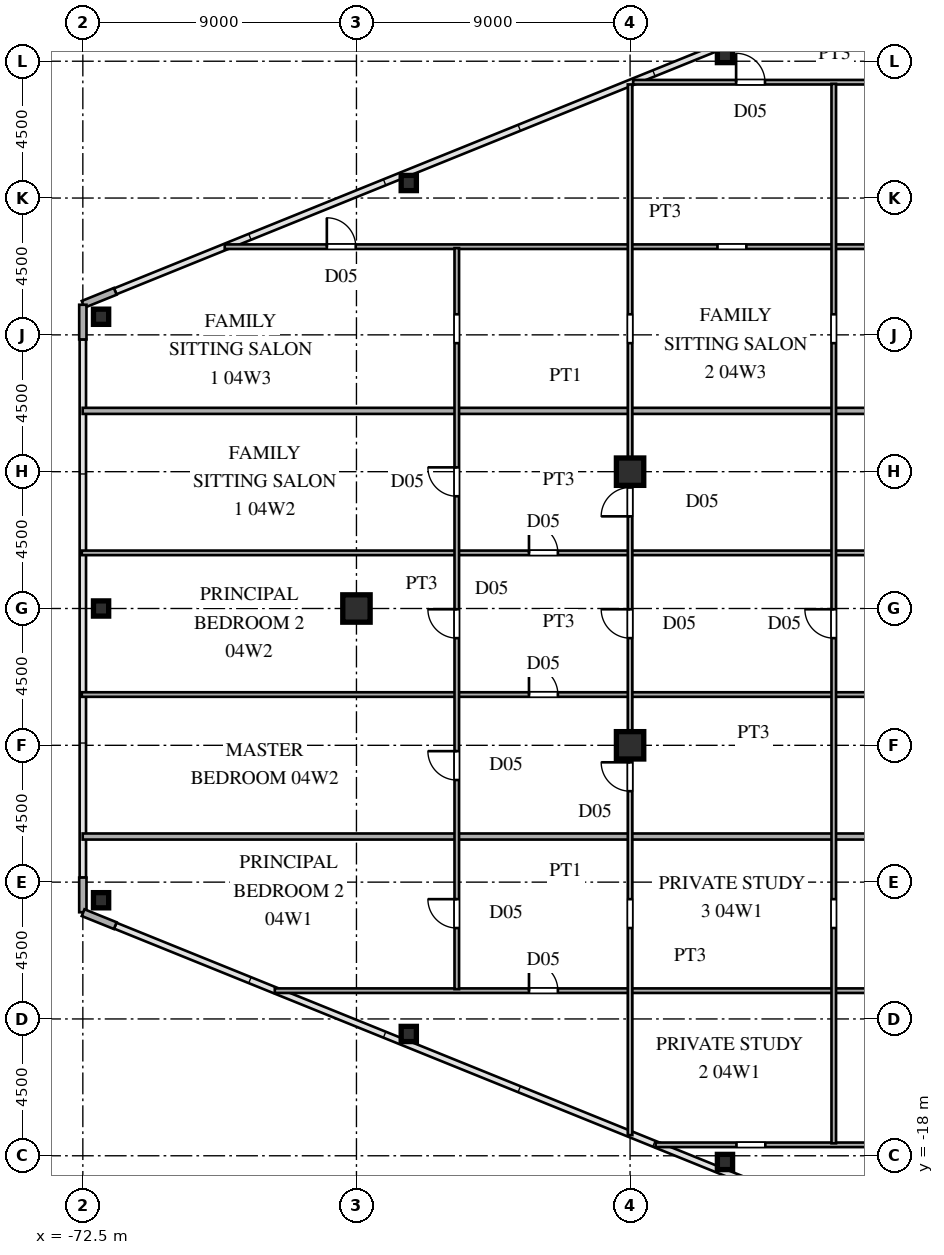
"""IFC4 building model, lengths in metres.
Left out: names, types, materials, properties, quantities, classifications, styles, units other than length and angle.
Written with IfcOpenShell. Run it as: python <this file> out.ifc"""

import sys

from ifc_helpers import new_model, si_unit, direction, frame, frame_2d, origin, origin_2d, place, context, subcontext, project, spatial, rectangle, hollow_rectangle, i_section, extrude, source, transform, mapped, element, fill, save


model = new_model("IFC4")
c1 = context("Model", 3, precision=1e-05, world=origin(), true_north=direction((0.0, 1.0)))
c2 = subcontext(c1, "Body", "Model", "MODEL_VIEW")
j1 = project(units=[si_unit("LENGTHUNIT", "METRE"), si_unit("PLANEANGLEUNIT", "RADIAN")], contexts=[c1])
p1 = place(None, origin())
s1 = spatial("IfcSite", under=j1, at=p1, CompositionType="ELEMENT")
p2 = place(p1, origin())
s2 = spatial("IfcBuilding", under=s1, at=p2, CompositionType="ELEMENT")
p3 = place(p2, frame((0.0, 0.0, 18.9)))
s3 = spatial("IfcBuildingStorey", under=s2, at=p3, CompositionType="ELEMENT", Elevation=18.9)
m1 = source(origin(), c2, "Body", "SweptSolid", [
    extrude(i_section(OverallWidth=0.9, OverallDepth=0.9, WebThickness=0.036, FlangeThickness=0.055, at=origin_2d()), origin(), (0.0, 0.0, 1.0), 3.6),
])
for number, where, z_axis, x_axis in (
    (1, (-54.5, -4.5, 0.0), (0.0, 0.0, 1.0), (1.0, 0.0, 0.0)),
    (2, (-54.5, 4.5, 0.0), (0.0, 0.0, 1.0), (1.0, 0.0, 0.0)),
    (3, (-63.5, 0.0, 0.0), (0.0, 0.0, 1.0), (1.0, 0.0, 0.0)),
):
    element("IfcColumn", number, at=place(p3, frame(where, z_axis=z_axis, x_axis=x_axis)), inside=s3, PredefinedType="COLUMN", context=c2, shape_type="MappedRepresentation", body=[
        mapped(m1, transform((0.0, 0.0, 0.0), scale=1.0)),
    ])
m2 = source(origin(), c2, "Body", "SweptSolid", [
    extrude(hollow_rectangle(XDim=0.5, YDim=0.5, WallThickness=0.02, at=origin_2d()), origin(), (0.0, 0.0, 1.0), 3.6),
])
for number, where, z_axis, x_axis in (
    (4, (-71.9, 9.596, 0.0), (0.0, 0.0, 1.0), (1.0, 0.0, 0.0)),
    (5, (-71.9, -9.596, 0.0), (0.0, 0.0, 1.0), (1.0, 0.0, 0.0)),
    (6, (-51.378, -18.204, 0.0), (0.0, 0.0, 1.0), (1.0, 0.0, 0.0)),
    (7, (-61.779, -13.994, 0.0), (0.0, 0.0, 1.0), (1.0, 0.0, 0.0)),
    (8, (-51.378, 18.204, 0.0), (0.0, 0.0, 1.0), (1.0, 0.0, 0.0)),
    (9, (-61.779, 13.994, 0.0), (0.0, 0.0, 1.0), (1.0, 0.0, 0.0)),
    (10, (-71.9, 0.0, 0.0), (0.0, 0.0, 1.0), (1.0, 0.0, 0.0)),
):
    element("IfcColumn", number, at=place(p3, frame(where, z_axis=z_axis, x_axis=x_axis)), inside=s3, PredefinedType="COLUMN", context=c2, shape_type="MappedRepresentation", body=[
        mapped(m2, transform((0.0, 0.0, 0.0), scale=1.0)),
    ])
for number, where, z_axis, x_axis in (
    (11, (-71.434, 10.431, 0.0), (0.0, 0.0, 1.0), (-0.927, -0.375, 0.0)),
    (12, (-72.5, 9.99, 0.0), (0.0, 0.0, 1.0), (0.0, -1.0, 0.0)),
    (13, (-72.5, -8.85, 0.0), (0.0, 0.0, 1.0), (0.0, -1.0, 0.0)),
    (14, (-72.491, -10.004, 0.0), (0.0, 0.0, 1.0), (0.927, -0.375, 0.0)),
):
    element("IfcWall", number, at=place(p3, frame(where, z_axis=z_axis, x_axis=x_axis)), inside=s3, PredefinedType="SOLIDWALL", context=c2, shape_type="SweptSolid", body=[
        extrude(rectangle(XDim=1.14, YDim=0.24, at=frame_2d((0.57, 0.0))), origin(), (0.0, 0.0, 1.0), 3.38),
    ])
p4 = place(p3, frame((-53.66, -17.64, 0.0), z_axis=(0.0, 0.0, 1.0), x_axis=(1.0, 0.0, 0.0)))
e15 = element("IfcWall", 15, at=p4, inside=s3, PredefinedType="PARTITIONING", context=c2, shape_type="SweptSolid", body=[
    extrude(rectangle(XDim=12.51, YDim=0.15, at=frame_2d((6.255, 0.0))), origin(), (0.0, 0.0, 1.0), 3.38),
])
p5 = place(p4, frame((8.735, 0.0, 0.0)))
e16 = element("IfcOpeningElement", 16, at=p5, cuts=e15, PredefinedType="OPENING", context=c2, shape_type="SweptSolid", body=[
    extrude(rectangle(XDim=0.95, YDim=2.15, at=frame_2d((0.475, 1.075))), frame((0.0, 0.085, 0.0), z_axis=(0.0, -1.0, 0.0), x_axis=(1.0, 0.0, 0.0)), (0.0, 0.0, 1.0), 0.17),
])
p6 = place(p4, frame((2.659, 0.0, 0.0)))
e17 = element("IfcOpeningElement", 17, at=p6, cuts=e15, PredefinedType="OPENING", context=c2, shape_type="SweptSolid", body=[
    extrude(rectangle(XDim=0.95, YDim=2.15, at=frame_2d((0.475, 1.075))), frame((0.0, 0.085, 0.0), z_axis=(0.0, -1.0, 0.0), x_axis=(1.0, 0.0, 0.0)), (0.0, 0.0, 1.0), 0.17),
])
p7 = place(p3, frame((-66.186, -12.57, 0.0), z_axis=(0.0, 0.0, 1.0), x_axis=(1.0, 0.0, 0.0)))
e18 = element("IfcWall", 18, at=p7, inside=s3, PredefinedType="PARTITIONING", context=c2, shape_type="SweptSolid", body=[
    extrude(rectangle(XDim=25.036, YDim=0.15, at=frame_2d((12.518, 0.0))), origin(), (0.0, 0.0, 1.0), 3.38),
])
p8 = place(p7, frame((21.261, 0.0, 0.0)))
e19 = element("IfcOpeningElement", 19, at=p8, cuts=e18, PredefinedType="OPENING", context=c2, shape_type="SweptSolid", body=[
    extrude(rectangle(XDim=0.95, YDim=2.15, at=frame_2d((0.475, 1.075))), frame((0.0, 0.085, 0.0), z_axis=(0.0, -1.0, 0.0), x_axis=(1.0, 0.0, 0.0)), (0.0, 0.0, 1.0), 0.17),
])
p9 = place(p7, frame((8.361, 0.0, 0.0)))
e20 = element("IfcOpeningElement", 20, at=p9, cuts=e18, PredefinedType="OPENING", context=c2, shape_type="SweptSolid", body=[
    extrude(rectangle(XDim=0.95, YDim=2.15, at=frame_2d((0.475, 1.075))), frame((0.0, 0.085, 0.0), z_axis=(0.0, -1.0, 0.0), x_axis=(1.0, 0.0, 0.0)), (0.0, 0.0, 1.0), 0.17),
])
p10 = place(p3, frame((-72.505, -7.5, 0.0), z_axis=(0.0, 0.0, 1.0), x_axis=(1.0, 0.0, 0.0)))
e21 = element("IfcWall", 21, at=p10, inside=s3, PredefinedType="PARTITIONING", context=c2, shape_type="SweptSolid", body=[
    extrude(rectangle(XDim=34.075, YDim=0.2, at=frame_2d((17.038, 0.0))), origin(), (0.0, 0.0, 1.0), 3.38),
])
p11 = place(p3, frame((-72.535, -2.83, 0.0), z_axis=(0.0, 0.0, 1.0), x_axis=(1.0, 0.0, 0.0)))
e22 = element("IfcWall", 22, at=p11, inside=s3, PredefinedType="PARTITIONING", context=c2, shape_type="SweptSolid", body=[
    extrude(rectangle(XDim=31.385, YDim=0.15, at=frame_2d((15.692, 0.0))), origin(), (0.0, 0.0, 1.0), 3.38),
])
p12 = place(p11, frame((27.61, 0.0, 0.0)))
e23 = element("IfcOpeningElement", 23, at=p12, cuts=e22, PredefinedType="OPENING", context=c2, shape_type="SweptSolid", body=[
    extrude(rectangle(XDim=0.95, YDim=2.15, at=frame_2d((0.475, 1.075))), frame((0.0, 0.085, 0.0), z_axis=(0.0, -1.0, 0.0), x_axis=(1.0, 0.0, 0.0)), (0.0, 0.0, 1.0), 0.17),
])
p13 = place(p11, frame((14.71, 0.0, 0.0)))
e24 = element("IfcOpeningElement", 24, at=p13, cuts=e22, PredefinedType="OPENING", context=c2, shape_type="SweptSolid", body=[
    extrude(rectangle(XDim=0.95, YDim=2.15, at=frame_2d((0.475, 1.075))), frame((0.0, 0.085, 0.0), z_axis=(0.0, -1.0, 0.0), x_axis=(1.0, 0.0, 0.0)), (0.0, 0.0, 1.0), 0.17),
])
p14 = place(p3, frame((-72.535, 1.83, 0.0), z_axis=(0.0, 0.0, 1.0), x_axis=(1.0, 0.0, 0.0)))
e25 = element("IfcWall", 25, at=p14, inside=s3, PredefinedType="PARTITIONING", context=c2, shape_type="SweptSolid", body=[
    extrude(rectangle(XDim=31.385, YDim=0.15, at=frame_2d((15.692, 0.0))), origin(), (0.0, 0.0, 1.0), 3.38),
])
p15 = place(p14, frame((27.61, 0.0, 0.0)))
e26 = element("IfcOpeningElement", 26, at=p15, cuts=e25, PredefinedType="OPENING", context=c2, shape_type="SweptSolid", body=[
    extrude(rectangle(XDim=0.95, YDim=2.15, at=frame_2d((0.475, 1.075))), frame((0.0, 0.085, 0.0), z_axis=(0.0, -1.0, 0.0), x_axis=(1.0, 0.0, 0.0)), (0.0, 0.0, 1.0), 0.17),
])
p16 = place(p14, frame((14.71, 0.0, 0.0)))
e27 = element("IfcOpeningElement", 27, at=p16, cuts=e25, PredefinedType="OPENING", context=c2, shape_type="SweptSolid", body=[
    extrude(rectangle(XDim=0.95, YDim=2.15, at=frame_2d((0.475, 1.075))), frame((0.0, 0.085, 0.0), z_axis=(0.0, -1.0, 0.0), x_axis=(1.0, 0.0, 0.0)), (0.0, 0.0, 1.0), 0.17),
])
p17 = place(p3, frame((-72.505, 6.5, 0.0), z_axis=(0.0, 0.0, 1.0), x_axis=(1.0, 0.0, 0.0)))
e28 = element("IfcWall", 28, at=p17, inside=s3, PredefinedType="PARTITIONING", context=c2, shape_type="SweptSolid", body=[
    extrude(rectangle(XDim=34.075, YDim=0.2, at=frame_2d((17.038, 0.0))), origin(), (0.0, 0.0, 1.0), 3.38),
])
p18 = place(p3, frame((-67.833, 11.9, 0.0), z_axis=(0.0, 0.0, 1.0), x_axis=(1.0, 0.0, 0.0)))
e29 = element("IfcWall", 29, at=p18, inside=s3, PredefinedType="PARTITIONING", context=c2, shape_type="SweptSolid", body=[
    extrude(rectangle(XDim=26.683, YDim=0.15, at=frame_2d((13.342, 0.0))), origin(), (0.0, 0.0, 1.0), 3.38),
])
p19 = place(p18, frame((22.908, 0.0, 0.0)))
e30 = element("IfcOpeningElement", 30, at=p19, cuts=e29, PredefinedType="OPENING", context=c2, shape_type="SweptSolid", body=[
    extrude(rectangle(XDim=0.95, YDim=2.15, at=frame_2d((0.475, 1.075))), frame((0.0, 0.085, 0.0), z_axis=(0.0, -1.0, 0.0), x_axis=(1.0, 0.0, 0.0)), (0.0, 0.0, 1.0), 0.17),
])
p20 = place(p18, frame((3.359, 0.0, 0.0)))
e31 = element("IfcOpeningElement", 31, at=p20, cuts=e29, PredefinedType="OPENING", context=c2, shape_type="SweptSolid", body=[
    extrude(rectangle(XDim=0.95, YDim=2.15, at=frame_2d((0.475, 1.075))), frame((0.0, 0.085, 0.0), z_axis=(0.0, -1.0, 0.0), x_axis=(1.0, 0.0, 0.0)), (0.0, 0.0, 1.0), 0.17),
])
p21 = place(p18, frame((16.208, 0.0, 0.0)))
e32 = element("IfcOpeningElement", 32, at=p21, cuts=e29, PredefinedType="OPENING", context=c2, shape_type="SweptSolid", body=[
    extrude(rectangle(XDim=0.95, YDim=2.15, at=frame_2d((0.475, 1.075))), frame((0.0, 0.085, 0.0), z_axis=(0.0, -1.0, 0.0), x_axis=(1.0, 0.0, 0.0)), (0.0, 0.0, 1.0), 0.17),
])
p22 = place(p3, frame((-54.399, 17.31, 0.0), z_axis=(0.0, 0.0, 1.0), x_axis=(1.0, 0.0, 0.0)))
e33 = element("IfcWall", 33, at=p22, inside=s3, PredefinedType="PARTITIONING", context=c2, shape_type="SweptSolid", body=[
    extrude(rectangle(XDim=13.249, YDim=0.15, at=frame_2d((6.625, 0.0))), origin(), (0.0, 0.0, 1.0), 3.38),
])
p23 = place(p22, frame((3.387, 0.0, 0.0)))
e34 = element("IfcOpeningElement", 34, at=p23, cuts=e33, PredefinedType="OPENING", context=c2, shape_type="SweptSolid", body=[
    extrude(rectangle(XDim=0.95, YDim=2.15, at=frame_2d((0.475, 1.075))), frame((0.0, 0.085, 0.0), z_axis=(0.0, -1.0, 0.0), x_axis=(1.0, 0.0, 0.0)), (0.0, 0.0, 1.0), 0.17),
])
p24 = place(p3, frame((-60.2, -12.52, 0.0), z_axis=(0.0, 0.0, 1.0), x_axis=(0.0, 1.0, 0.0)))
e35 = element("IfcWall", 35, at=p24, inside=s3, PredefinedType="PARTITIONING", context=c2, shape_type="SweptSolid", body=[
    extrude(rectangle(XDim=24.373, YDim=0.15, at=frame_2d((12.187, 0.0))), origin(), (0.0, 0.0, 1.0), 3.38),
])
p25 = place(p24, frame((2.01, 0.0, 0.0)))
e36 = element("IfcOpeningElement", 36, at=p25, cuts=e35, PredefinedType="OPENING", context=c2, shape_type="SweptSolid", body=[
    extrude(rectangle(XDim=0.95, YDim=2.15, at=frame_2d((0.475, 1.075))), frame((0.0, 0.085, 0.0), z_axis=(0.0, -1.0, 0.0), x_axis=(1.0, 0.0, 0.0)), (0.0, 0.0, 1.0), 0.17),
])
p26 = place(p24, frame((6.878, 0.0, 0.0)))
e37 = element("IfcOpeningElement", 37, at=p26, cuts=e35, PredefinedType="OPENING", context=c2, shape_type="SweptSolid", body=[
    extrude(rectangle(XDim=0.95, YDim=2.15, at=frame_2d((0.475, 1.075))), frame((0.0, 0.085, 0.0), z_axis=(0.0, -1.0, 0.0), x_axis=(1.0, 0.0, 0.0)), (0.0, 0.0, 1.0), 0.17),
])
p27 = place(p24, frame((11.545, 0.0, 0.0)))
e38 = element("IfcOpeningElement", 38, at=p27, cuts=e35, PredefinedType="OPENING", context=c2, shape_type="SweptSolid", body=[
    extrude(rectangle(XDim=0.95, YDim=2.15, at=frame_2d((0.475, 1.075))), frame((0.0, 0.085, 0.0), z_axis=(0.0, -1.0, 0.0), x_axis=(1.0, 0.0, 0.0)), (0.0, 0.0, 1.0), 0.17),
])
p28 = place(p24, frame((16.212, 0.0, 0.0)))
e39 = element("IfcOpeningElement", 39, at=p28, cuts=e35, PredefinedType="OPENING", context=c2, shape_type="SweptSolid", body=[
    extrude(rectangle(XDim=0.95, YDim=2.15, at=frame_2d((0.475, 1.075))), frame((0.0, 0.085, 0.0), z_axis=(0.0, -1.0, 0.0), x_axis=(1.0, 0.0, 0.0)), (0.0, 0.0, 1.0), 0.17),
])
p29 = place(p24, frame((21.247, 0.0, 0.0)))
e40 = element("IfcOpeningElement", 40, at=p29, cuts=e35, PredefinedType="OPENING", context=c2, shape_type="SweptSolid", body=[
    extrude(rectangle(XDim=0.95, YDim=2.15, at=frame_2d((0.475, 1.075))), frame((0.0, 0.085, 0.0), z_axis=(0.0, -1.0, 0.0), x_axis=(1.0, 0.0, 0.0)), (0.0, 0.0, 1.0), 0.17),
])
p30 = place(p3, frame((-54.5, -17.321, 0.0), z_axis=(0.0, 0.0, 1.0), x_axis=(0.0, 1.0, 0.0)))
e41 = element("IfcWall", 41, at=p30, inside=s3, PredefinedType="PARTITIONING", context=c2, shape_type="SweptSolid", body=[
    extrude(rectangle(XDim=34.557, YDim=0.15, at=frame_2d((17.279, 0.0))), origin(), (0.0, 0.0, 1.0), 2.68),
])
p31 = place(p30, frame((6.811, 0.0, 0.0)))
e42 = element("IfcOpeningElement", 42, at=p31, cuts=e41, PredefinedType="OPENING", context=c2, shape_type="SweptSolid", body=[
    extrude(rectangle(XDim=0.95, YDim=2.15, at=frame_2d((0.475, 1.075))), frame((0.0, 0.085, 0.0), z_axis=(0.0, -1.0, 0.0), x_axis=(1.0, 0.0, 0.0)), (0.0, 0.0, 1.0), 0.17),
])
p32 = place(p30, frame((16.346, 0.0, 0.0)))
e43 = element("IfcOpeningElement", 43, at=p32, cuts=e41, PredefinedType="OPENING", context=c2, shape_type="SweptSolid", body=[
    extrude(rectangle(XDim=0.95, YDim=2.15, at=frame_2d((0.475, 1.075))), frame((0.0, 0.085, 0.0), z_axis=(0.0, -1.0, 0.0), x_axis=(1.0, 0.0, 0.0)), (0.0, 0.0, 1.0), 0.17),
])
p33 = place(p30, frame((11.312, 0.0, 0.0)))
e44 = element("IfcOpeningElement", 44, at=p33, cuts=e41, PredefinedType="OPENING", context=c2, shape_type="SweptSolid", body=[
    extrude(rectangle(XDim=0.95, YDim=2.15, at=frame_2d((0.475, 1.075))), frame((0.0, 0.085, 0.0), z_axis=(0.0, -1.0, 0.0), x_axis=(1.0, 0.0, 0.0)), (0.0, 0.0, 1.0), 0.17),
])
p34 = place(p30, frame((20.352, 0.0, 0.0)))
e45 = element("IfcOpeningElement", 45, at=p34, cuts=e41, PredefinedType="OPENING", context=c2, shape_type="SweptSolid", body=[
    extrude(rectangle(XDim=0.95, YDim=2.15, at=frame_2d((0.475, 1.075))), frame((0.0, 0.085, 0.0), z_axis=(0.0, -1.0, 0.0), x_axis=(1.0, 0.0, 0.0)), (0.0, 0.0, 1.0), 0.17),
])
p35 = place(p30, frame((26.048, 0.0, 0.0)))
e46 = element("IfcOpeningElement", 46, at=p35, cuts=e41, PredefinedType="OPENING", context=c2, shape_type="SweptSolid", body=[
    extrude(rectangle(XDim=0.95, YDim=2.15, at=frame_2d((0.475, 1.075))), frame((0.0, 0.085, 0.0), z_axis=(0.0, -1.0, 0.0), x_axis=(1.0, 0.0, 0.0)), (0.0, 0.0, 1.0), 0.17),
])
p36 = place(p3, frame((-47.8, -17.59, 0.0), z_axis=(0.0, 0.0, 1.0), x_axis=(0.0, 1.0, 0.0)))
e47 = element("IfcWall", 47, at=p36, inside=s3, PredefinedType="PARTITIONING", context=c2, shape_type="SweptSolid", body=[
    extrude(rectangle(XDim=34.846, YDim=0.15, at=frame_2d((17.423, 0.0))), origin(), (0.0, 0.0, 1.0), 3.38),
])
p37 = place(p36, frame((7.08, 0.0, 0.0)))
e48 = element("IfcOpeningElement", 48, at=p37, cuts=e47, PredefinedType="OPENING", context=c2, shape_type="SweptSolid", body=[
    extrude(rectangle(XDim=0.95, YDim=2.15, at=frame_2d((0.475, 1.075))), frame((0.0, 0.085, 0.0), z_axis=(0.0, -1.0, 0.0), x_axis=(1.0, 0.0, 0.0)), (0.0, 0.0, 1.0), 0.17),
])
p38 = place(p36, frame((16.615, 0.0, 0.0)))
e49 = element("IfcOpeningElement", 49, at=p38, cuts=e47, PredefinedType="OPENING", context=c2, shape_type="SweptSolid", body=[
    extrude(rectangle(XDim=0.95, YDim=2.15, at=frame_2d((0.475, 1.075))), frame((0.0, 0.085, 0.0), z_axis=(0.0, -1.0, 0.0), x_axis=(1.0, 0.0, 0.0)), (0.0, 0.0, 1.0), 0.17),
])
p39 = place(p36, frame((26.317, 0.0, 0.0)))
e50 = element("IfcOpeningElement", 50, at=p39, cuts=e47, PredefinedType="OPENING", context=c2, shape_type="SweptSolid", body=[
    extrude(rectangle(XDim=0.95, YDim=2.15, at=frame_2d((0.475, 1.075))), frame((0.0, 0.085, 0.0), z_axis=(0.0, -1.0, 0.0), x_axis=(1.0, 0.0, 0.0)), (0.0, 0.0, 1.0), 0.17),
])
m3 = source(origin(), c2, "Body", "SweptSolid", [
    extrude(rectangle(XDim=0.95, YDim=2.15, at=frame_2d((0.475, 1.075))), frame((0.0, 0.025, 0.0), z_axis=(0.0, -1.0, 0.0), x_axis=(1.0, 0.0, 0.0)), (0.0, 0.0, 1.0), 0.05),
])
p40 = place(p9, origin())
e51 = element("IfcDoor", 51, at=p40, inside=s3, OperationType="SINGLE_SWING_LEFT", PredefinedType="DOOR", context=c2, shape_type="MappedRepresentation", body=[
    mapped(m3, transform((0.0, 0.0, 0.0), scale=1.0)),
])
fill(e20, e51)
p41 = place(p13, origin())
e52 = element("IfcDoor", 52, at=p41, inside=s3, OperationType="SINGLE_SWING_LEFT", PredefinedType="DOOR", context=c2, shape_type="MappedRepresentation", body=[
    mapped(m3, transform((0.0, 0.0, 0.0), scale=1.0)),
])
fill(e24, e52)
p42 = place(p16, origin())
e53 = element("IfcDoor", 53, at=p42, inside=s3, OperationType="SINGLE_SWING_LEFT", PredefinedType="DOOR", context=c2, shape_type="MappedRepresentation", body=[
    mapped(m3, transform((0.0, 0.0, 0.0), scale=1.0)),
])
fill(e27, e53)
p43 = place(p20, origin())
e54 = element("IfcDoor", 54, at=p43, inside=s3, OperationType="SINGLE_SWING_LEFT", PredefinedType="DOOR", context=c2, shape_type="MappedRepresentation", body=[
    mapped(m3, transform((0.0, 0.0, 0.0), scale=1.0)),
])
fill(e31, e54)
p44 = place(p23, origin())
e55 = element("IfcDoor", 55, at=p44, inside=s3, OperationType="SINGLE_SWING_LEFT", PredefinedType="DOOR", context=c2, shape_type="MappedRepresentation", body=[
    mapped(m3, transform((0.0, 0.0, 0.0), scale=1.0)),
])
fill(e34, e55)
p45 = place(p25, origin())
e56 = element("IfcDoor", 56, at=p45, inside=s3, OperationType="SINGLE_SWING_RIGHT", PredefinedType="DOOR", context=c2, shape_type="MappedRepresentation", body=[
    mapped(m3, transform((0.0, 0.0, 0.0), scale=1.0)),
])
fill(e36, e56)
p46 = place(p26, origin())
e57 = element("IfcDoor", 57, at=p46, inside=s3, OperationType="SINGLE_SWING_RIGHT", PredefinedType="DOOR", context=c2, shape_type="MappedRepresentation", body=[
    mapped(m3, transform((0.0, 0.0, 0.0), scale=1.0)),
])
fill(e37, e57)
p47 = place(p27, origin())
e58 = element("IfcDoor", 58, at=p47, inside=s3, OperationType="SINGLE_SWING_RIGHT", PredefinedType="DOOR", context=c2, shape_type="MappedRepresentation", body=[
    mapped(m3, transform((0.0, 0.0, 0.0), scale=1.0)),
])
fill(e38, e58)
p48 = place(p28, origin())
e59 = element("IfcDoor", 59, at=p48, inside=s3, OperationType="SINGLE_SWING_RIGHT", PredefinedType="DOOR", context=c2, shape_type="MappedRepresentation", body=[
    mapped(m3, transform((0.0, 0.0, 0.0), scale=1.0)),
])
fill(e39, e59)
p49 = place(p32, origin())
e60 = element("IfcDoor", 60, at=p49, inside=s3, OperationType="SINGLE_SWING_RIGHT", PredefinedType="DOOR", context=c2, shape_type="MappedRepresentation", body=[
    mapped(m3, transform((0.0, 0.0, 0.0), scale=1.0)),
])
fill(e43, e60)
p50 = place(p33, origin())
e61 = element("IfcDoor", 61, at=p50, inside=s3, OperationType="SINGLE_SWING_RIGHT", PredefinedType="DOOR", context=c2, shape_type="MappedRepresentation", body=[
    mapped(m3, transform((0.0, 0.0, 0.0), scale=1.0)),
])
fill(e44, e61)
p51 = place(p34, origin())
e62 = element("IfcDoor", 62, at=p51, inside=s3, OperationType="SINGLE_SWING_LEFT", PredefinedType="DOOR", context=c2, shape_type="MappedRepresentation", body=[
    mapped(m3, transform((0.0, 0.0, 0.0), scale=1.0)),
])
fill(e45, e62)
p52 = place(p38, origin())
e63 = element("IfcDoor", 63, at=p52, inside=s3, OperationType="SINGLE_SWING_RIGHT", PredefinedType="DOOR", context=c2, shape_type="MappedRepresentation", body=[
    mapped(m3, transform((0.0, 0.0, 0.0), scale=1.0)),
])
fill(e49, e63)
save(model, sys.argv[1])
